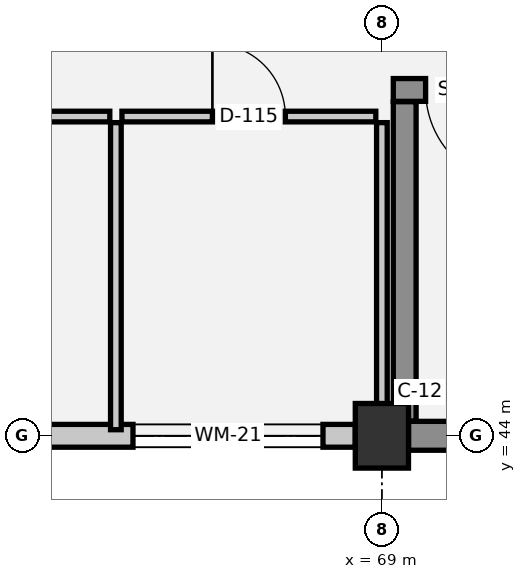
"""IFC4 building model, lengths in metres.
Left out: names, types, materials, properties, quantities, classifications, styles, units other than length and angle.
Written with IfcOpenShell. Run it as: python <this file> out.ifc"""

import sys

from ifc_helpers import new_model, si_unit, direction, frame, frame_2d, origin, origin_2d, place, context, subcontext, project, spatial, rectangle, extrude, element, fill, save


model = new_model("IFC4")
c1 = context("Model", 3, precision=1e-05, world=origin(), true_north=direction((0.0, 1.0)))
c2 = subcontext(c1, "Body", "Model", "MODEL_VIEW")
j1 = project(units=[si_unit("LENGTHUNIT", "METRE"), si_unit("PLANEANGLEUNIT", "RADIAN")], contexts=[c1])
p1 = place(None, origin())
s1 = spatial("IfcSite", under=j1, at=p1, CompositionType="ELEMENT")
p2 = place(p1, origin())
s2 = spatial("IfcBuilding", under=s1, at=p2, CompositionType="ELEMENT")
p3 = place(p2, frame((0.0, 0.0, 5.4)))
s3 = spatial("IfcBuildingStorey", under=s2, at=p3, CompositionType="ELEMENT", Elevation=5.4)
p4 = place(p3, frame((69.0, 44.0, 0.0), z_axis=(0.0, 0.0, 1.0), x_axis=(1.0, 0.0, 0.0)))
e1 = element("IfcColumn", 1, at=p4, inside=s3, PredefinedType="COLUMN", context=c2, shape_type="SweptSolid", body=[
    extrude(rectangle(XDim=0.7, YDim=0.85, at=origin_2d()), origin(), (0.0, 0.0, 1.0), 4.5),
])
p5 = place(p3, frame((76.65, 44.0, 0.0), z_axis=(0.0, 0.0, 1.0), x_axis=(-1.0, 0.0, 0.0)))
e2 = element("IfcWall", 2, at=p5, inside=s3, PredefinedType="STANDARD", context=c2, shape_type="SweptSolid", body=[
    extrude(rectangle(XDim=7.3, YDim=0.38, at=frame_2d((3.65, 0.0))), origin(), (0.0, 0.0, 1.0), 3.23),
])
p6 = place(p5, frame((3.025, 0.0, 0.95)))
e3 = element("IfcOpeningElement", 3, at=p6, cuts=e2, PredefinedType="OPENING", context=c2, shape_type="SweptSolid", body=[
    extrude(rectangle(XDim=1.25, YDim=1.65, at=frame_2d((0.625, 0.825))), frame((0.0, 0.2, 0.0), z_axis=(0.0, -1.0, 0.0), x_axis=(1.0, 0.0, 0.0)), (0.0, 0.0, 1.0), 0.4),
])
p7 = place(p3, frame((68.65, 44.0, 0.0), z_axis=(0.0, 0.0, 1.0), x_axis=(-1.0, 0.0, 0.0)))
e4 = element("IfcWall", 4, at=p7, inside=s3, PredefinedType="SOLIDWALL", context=c2, shape_type="SweptSolid", body=[
    extrude(rectangle(XDim=6.3, YDim=0.3, at=frame_2d((3.15, 0.0))), origin(), (0.0, 0.0, 1.0), 3.23),
])
p8 = place(p7, frame((0.425, 0.0, 1.0)))
e5 = element("IfcOpeningElement", 5, at=p8, cuts=e4, PredefinedType="OPENING", context=c2, shape_type="SweptSolid", body=[
    extrude(rectangle(XDim=2.5, YDim=1.3, at=frame_2d((1.25, 0.65))), frame((0.0, 0.16, 0.0), z_axis=(0.0, -1.0, 0.0), x_axis=(1.0, 0.0, 0.0)), (0.0, 0.0, 1.0), 0.32),
])
p9 = place(p3, frame((76.85, 48.55, 0.0), z_axis=(0.0, 0.0, 1.0), x_axis=(-1.0, 0.0, 0.0)))
e6 = element("IfcWall", 6, at=p9, inside=s3, PredefinedType="SHEAR", context=c2, shape_type="SweptSolid", body=[
    extrude(rectangle(XDim=7.7, YDim=0.3, at=frame_2d((3.85, 0.0))), origin(), (0.0, 0.0, 1.0), 4.2),
])
p10 = place(p9, frame((6.025, 0.0, 0.0)))
e7 = element("IfcOpeningElement", 7, at=p10, cuts=e6, PredefinedType="OPENING", context=c2, shape_type="SweptSolid", body=[
    extrude(rectangle(XDim=1.25, YDim=2.15, at=frame_2d((0.625, 1.075))), frame((0.0, 0.16, 0.0), z_axis=(0.0, -1.0, 0.0), x_axis=(1.0, 0.0, 0.0)), (0.0, 0.0, 1.0), 0.32),
])
p11 = place(p3, frame((69.3, 48.395, 0.0), z_axis=(0.0, 0.0, 1.0), x_axis=(0.0, -1.0, 0.0)))
e8 = element("IfcWall", 8, at=p11, inside=s3, PredefinedType="SHEAR", context=c2, shape_type="SweptSolid", body=[
    extrude(rectangle(XDim=4.2, YDim=0.3, at=frame_2d((2.1, 0.0))), origin(), (0.0, 0.0, 1.0), 4.2),
])
p12 = place(p3, frame((62.08, 48.2, 0.0), z_axis=(0.0, 0.0, 1.0), x_axis=(1.0, 0.0, 0.0)))
e9 = element("IfcWall", 9, at=p12, inside=s3, PredefinedType="PLUMBINGWALL", context=c2, shape_type="SweptSolid", body=[
    extrude(rectangle(XDim=3.34, YDim=0.14, at=frame_2d((1.67, 0.0))), origin(), (0.0, 0.0, 1.0), 4.14),
])
p13 = place(p12, frame((1.21, 0.0, 0.0)))
e10 = element("IfcOpeningElement", 10, at=p13, cuts=e9, PredefinedType="OPENING", context=c2, shape_type="SweptSolid", body=[
    extrude(rectangle(XDim=0.92, YDim=2.1, at=frame_2d((0.46, 1.05))), frame((0.0, 0.08, 0.0), z_axis=(0.0, -1.0, 0.0), x_axis=(1.0, 0.0, 0.0)), (0.0, 0.0, 1.0), 0.16),
])
p14 = place(p3, frame((65.58, 48.2, 0.0), z_axis=(0.0, 0.0, 1.0), x_axis=(1.0, 0.0, 0.0)))
e11 = element("IfcWall", 11, at=p14, inside=s3, PredefinedType="PLUMBINGWALL", context=c2, shape_type="SweptSolid", body=[
    extrude(rectangle(XDim=3.34, YDim=0.14, at=frame_2d((1.67, 0.0))), origin(), (0.0, 0.0, 1.0), 4.14),
])
p15 = place(p14, frame((1.19, 0.0, 0.0)))
e12 = element("IfcOpeningElement", 12, at=p15, cuts=e11, PredefinedType="OPENING", context=c2, shape_type="SweptSolid", body=[
    extrude(rectangle(XDim=0.96, YDim=2.1, at=frame_2d((0.48, 1.05))), frame((0.0, 0.08, 0.0), z_axis=(0.0, -1.0, 0.0), x_axis=(1.0, 0.0, 0.0)), (0.0, 0.0, 1.0), 0.16),
])
p16 = place(p3, frame((65.5, 44.08, 0.0), z_axis=(0.0, 0.0, 1.0), x_axis=(0.0, 1.0, 0.0)))
e13 = element("IfcWall", 13, at=p16, inside=s3, PredefinedType="PLUMBINGWALL", context=c2, shape_type="SweptSolid", body=[
    extrude(rectangle(XDim=4.04, YDim=0.14, at=frame_2d((2.02, 0.0))), origin(), (0.0, 0.0, 1.0), 4.14),
])
p17 = place(p3, frame((69.0, 44.08, 0.0), z_axis=(0.0, 0.0, 1.0), x_axis=(0.0, 1.0, 0.0)))
e14 = element("IfcWall", 14, at=p17, inside=s3, PredefinedType="PLUMBINGWALL", context=c2, shape_type="SweptSolid", body=[
    extrude(rectangle(XDim=4.04, YDim=0.14, at=frame_2d((2.02, 0.0))), origin(), (0.0, 0.0, 1.0), 3.5),
])
p18 = place(p8, origin())
e15 = element("IfcWindow", 15, at=p18, inside=s3, PartitioningType="SINGLE_PANEL", PredefinedType="WINDOW", context=c2, shape_type="SweptSolid", body=[
    extrude(rectangle(XDim=2.5, YDim=1.3, at=frame_2d((1.25, 0.65))), frame((0.0, 0.03, 0.0), z_axis=(0.0, -1.0, 0.0), x_axis=(1.0, 0.0, 0.0)), (0.0, 0.0, 1.0), 0.06),
])
fill(e5, e15)
p19 = place(p10, origin())
e16 = element("IfcDoor", 16, at=p19, inside=s3, OperationType="SINGLE_SWING_LEFT", PredefinedType="DOOR", context=c2, shape_type="SweptSolid", body=[
    extrude(rectangle(XDim=1.25, YDim=2.15, at=frame_2d((0.625, 1.075))), frame((0.0, 0.025, 0.0), z_axis=(0.0, -1.0, 0.0), x_axis=(1.0, 0.0, 0.0)), (0.0, 0.0, 1.0), 0.05),
])
fill(e7, e16)
p20 = place(p15, origin())
e17 = element("IfcDoor", 17, at=p20, inside=s3, OperationType="SINGLE_SWING_LEFT", PredefinedType="DOOR", context=c2, shape_type="SweptSolid", body=[
    extrude(rectangle(XDim=0.96, YDim=2.1, at=frame_2d((0.48, 1.05))), frame((0.0, 0.025, 0.0), z_axis=(0.0, -1.0, 0.0), x_axis=(1.0, 0.0, 0.0)), (0.0, 0.0, 1.0), 0.05),
])
fill(e12, e17)
save(model, sys.argv[1])
